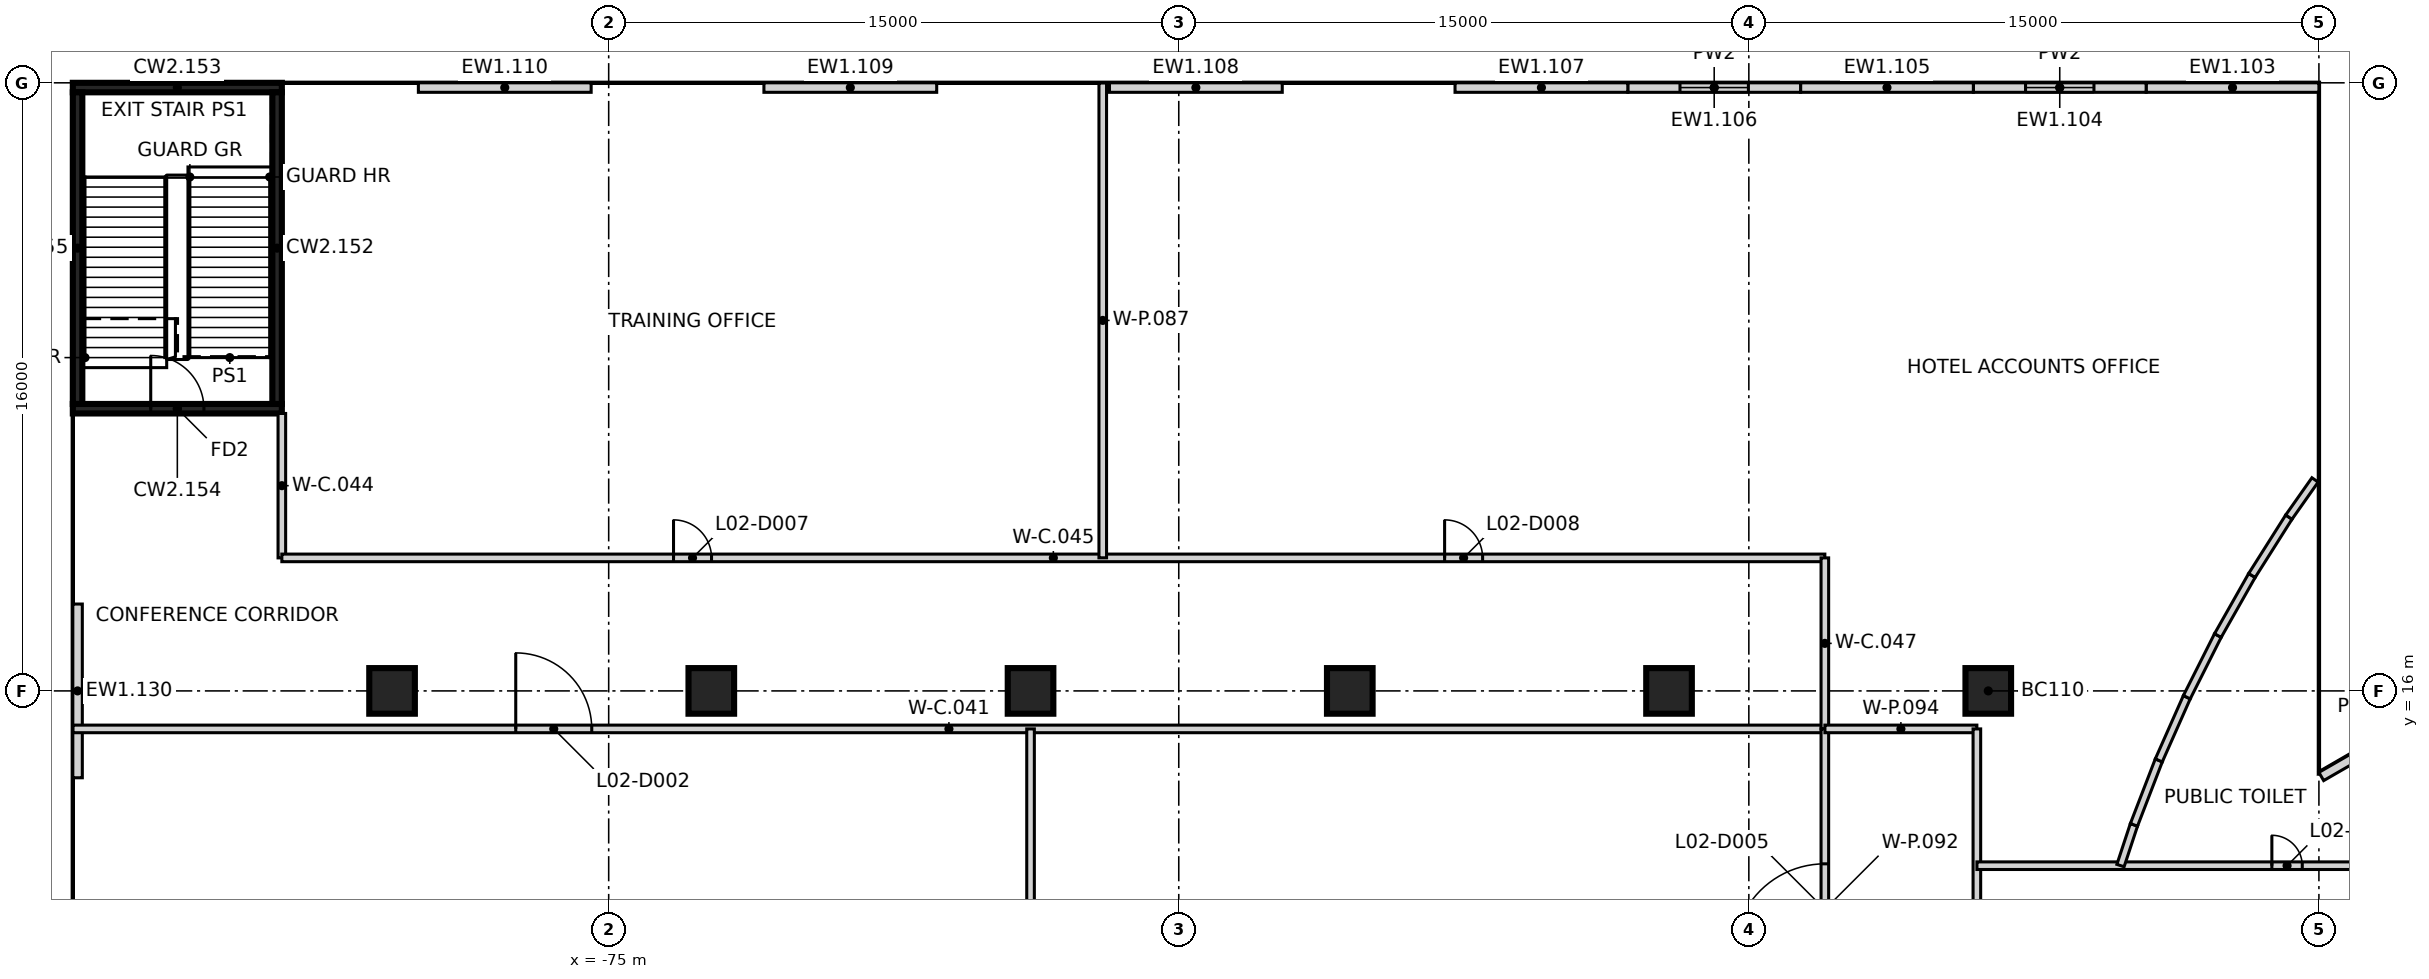
"""IFC4 building model, lengths in metres.
Left out: names, types, materials, properties, quantities, classifications, styles, units other than length and angle.
Written with IfcOpenShell. Run it as: python <this file> out.ifc"""

import sys

from ifc_helpers import new_model, si_unit, direction, frame, frame_2d, origin, origin_2d, place, context, subcontext, project, spatial, rectangle, extrude, element, fill, save


model = new_model("IFC4")
c1 = context("Model", 3, precision=1e-05, world=origin(), true_north=direction((0.0, 1.0)))
c2 = subcontext(c1, "Body", "Model", "MODEL_VIEW")
j1 = project(units=[si_unit("LENGTHUNIT", "METRE"), si_unit("PLANEANGLEUNIT", "RADIAN")], contexts=[c1])
p1 = place(None, origin())
s1 = spatial("IfcSite", under=j1, at=p1, CompositionType="ELEMENT")
p2 = place(p1, origin())
s2 = spatial("IfcBuilding", under=s1, at=p2, CompositionType="ELEMENT")
p3 = place(p2, frame((0.0, 0.0, 14.0)))
s3 = spatial("IfcBuildingStorey", under=s2, at=p3, CompositionType="ELEMENT", Elevation=14.0)
for number, where, z_axis, x_axis in (
    (1, (-80.7, 16.0, -0.35), (0.0, 0.0, 1.0), (1.0, 0.0, 0.0)),
    (2, (-72.3, 16.0, -0.35), (0.0, 0.0, 1.0), (1.0, 0.0, 0.0)),
    (3, (-63.9, 16.0, -0.35), (0.0, 0.0, 1.0), (1.0, 0.0, 0.0)),
    (4, (-55.5, 16.0, -0.35), (0.0, 0.0, 1.0), (1.0, 0.0, 0.0)),
    (5, (-47.1, 16.0, -0.35), (0.0, 0.0, 1.0), (1.0, 0.0, 0.0)),
    (6, (-38.7, 16.0, -0.35), (0.0, 0.0, 1.0), (1.0, 0.0, 0.0)),
):
    element("IfcColumn", number, at=place(p3, frame(where, z_axis=z_axis, x_axis=x_axis)), inside=s3, PredefinedType="COLUMN", context=c2, shape_type="SweptSolid", body=[
        extrude(rectangle(XDim=1.2, YDim=1.2, at=origin_2d()), origin(), (0.0, 0.0, 1.0), 5.5),
    ])
p4 = place(p3, frame((-29.938, 13.748, 0.0), z_axis=(0.0, 0.0, 1.0), x_axis=(0.866193503994, 0.4997087288, 0.0)))
e7 = element("IfcWall", 7, at=p4, inside=s3, PredefinedType="SOLIDWALL", context=c2, shape_type="SweptSolid", body=[
    extrude(rectangle(XDim=4.62, YDim=0.25, at=frame_2d((2.31, 0.0))), origin(), (0.0, 0.0, 1.0), 5.15),
])
p5 = place(p4, frame((1.41, 0.0, 1.1)))
e8 = element("IfcOpeningElement", 8, at=p5, cuts=e7, PredefinedType="OPENING", context=c2, shape_type="SweptSolid", body=[
    extrude(rectangle(XDim=1.8, YDim=1.5, at=frame_2d((0.9, 0.75))), frame((0.0, 0.135, 0.0), z_axis=(0.0, -1.0, 0.0), x_axis=(1.0, 0.0, 0.0)), (0.0, 0.0, 1.0), 0.27),
])
p6 = place(p3, frame((-34.546, 31.875, 0.0), z_axis=(0.0, 0.0, 1.0), x_axis=(1.0, 0.0, 0.0)))
e9 = element("IfcWall", 9, at=p6, inside=s3, PredefinedType="SOLIDWALL", context=c2, shape_type="SweptSolid", body=[
    extrude(rectangle(XDim=4.546, YDim=0.25, at=frame_2d((2.273, 0.0))), origin(), (0.0, 0.0, 1.0), 5.15),
])
p7 = place(p3, frame((-39.092, 31.875, 0.0), z_axis=(0.0, 0.0, 1.0), x_axis=(1.0, 0.0, 0.0)))
e10 = element("IfcWall", 10, at=p7, inside=s3, PredefinedType="SOLIDWALL", context=c2, shape_type="SweptSolid", body=[
    extrude(rectangle(XDim=4.546, YDim=0.25, at=frame_2d((2.273, 0.0))), origin(), (0.0, 0.0, 1.0), 5.15),
])
p8 = place(p7, frame((1.373, 0.0, 1.1)))
e11 = element("IfcOpeningElement", 11, at=p8, cuts=e10, PredefinedType="OPENING", context=c2, shape_type="SweptSolid", body=[
    extrude(rectangle(XDim=1.8, YDim=1.5, at=frame_2d((0.9, 0.75))), frame((0.0, 0.135, 0.0), z_axis=(0.0, -1.0, 0.0), x_axis=(1.0, 0.0, 0.0)), (0.0, 0.0, 1.0), 0.27),
])
p9 = place(p3, frame((-43.638, 31.875, 0.0), z_axis=(0.0, 0.0, 1.0), x_axis=(1.0, 0.0, 0.0)))
e12 = element("IfcWall", 12, at=p9, inside=s3, PredefinedType="SOLIDWALL", context=c2, shape_type="SweptSolid", body=[
    extrude(rectangle(XDim=4.546, YDim=0.25, at=frame_2d((2.273, 0.0))), origin(), (0.0, 0.0, 1.0), 5.15),
])
p10 = place(p3, frame((-48.185, 31.875, 0.0), z_axis=(0.0, 0.0, 1.0), x_axis=(1.0, 0.0, 0.0)))
e13 = element("IfcWall", 13, at=p10, inside=s3, PredefinedType="SOLIDWALL", context=c2, shape_type="SweptSolid", body=[
    extrude(rectangle(XDim=4.546, YDim=0.25, at=frame_2d((2.273, 0.0))), origin(), (0.0, 0.0, 1.0), 5.15),
])
p11 = place(p10, frame((1.373, 0.0, 1.1)))
e14 = element("IfcOpeningElement", 14, at=p11, cuts=e13, PredefinedType="OPENING", context=c2, shape_type="SweptSolid", body=[
    extrude(rectangle(XDim=1.8, YDim=1.5, at=frame_2d((0.9, 0.75))), frame((0.0, 0.135, 0.0), z_axis=(0.0, -1.0, 0.0), x_axis=(1.0, 0.0, 0.0)), (0.0, 0.0, 1.0), 0.27),
])
for number, where, z_axis, x_axis in (
    (15, (-52.731, 31.875, 0.0), (0.0, 0.0, 1.0), (1.0, 0.0, 0.0)),
    (16, (-61.823, 31.875, 0.0), (0.0, 0.0, 1.0), (1.0, 0.0, 0.0)),
    (17, (-70.915, 31.875, 0.0), (0.0, 0.0, 1.0), (1.0, 0.0, 0.0)),
):
    element("IfcWall", number, at=place(p3, frame(where, z_axis=z_axis, x_axis=x_axis)), inside=s3, PredefinedType="SOLIDWALL", context=c2, shape_type="SweptSolid", body=[
        extrude(rectangle(XDim=4.546, YDim=0.25, at=frame_2d((2.273, 0.0))), origin(), (0.0, 0.0, 1.0), 5.15),
    ])
p12 = place(p3, frame((-80.008, 31.875, 0.0), z_axis=(0.0, 0.0, 1.0), x_axis=(1.0, 0.0, 0.0)))
e18 = element("IfcWall", 18, at=p12, inside=s3, PredefinedType="SOLIDWALL", context=c2, shape_type="SweptSolid", body=[
    extrude(rectangle(XDim=4.546, YDim=0.25, at=frame_2d((2.273, 0.0))), origin(), (0.0, 0.0, 1.0), 5.15),
])
p13 = place(p3, frame((-88.975, 13.714, 0.0), z_axis=(0.0, 0.0, 1.0), x_axis=(0.0, 1.0, 0.0)))
e19 = element("IfcWall", 19, at=p13, inside=s3, PredefinedType="SOLIDWALL", context=c2, shape_type="SweptSolid", body=[
    extrude(rectangle(XDim=4.571, YDim=0.25, at=frame_2d((2.286, 0.0))), origin(), (0.0, 0.0, 1.0), 5.15),
])
p14 = place(p3, frame((-89.1, 23.425, 0.0), z_axis=(0.0, 0.0, 1.0), x_axis=(1.0, 0.0, 0.0)))
e20 = element("IfcWall", 20, at=p14, inside=s3, PredefinedType="SHEAR", context=c2, shape_type="SweptSolid", body=[
    extrude(rectangle(XDim=5.5, YDim=0.25, at=frame_2d((2.75, 0.0))), origin(), (0.0, 0.0, 1.0), 5.15),
])
p15 = place(p14, frame((2.05, 0.0, 0.0)))
e21 = element("IfcOpeningElement", 21, at=p15, cuts=e20, PredefinedType="OPENING", context=c2, shape_type="SweptSolid", body=[
    extrude(rectangle(XDim=1.4, YDim=2.1, at=frame_2d((0.7, 1.05))), frame((0.0, 0.135, 0.0), z_axis=(0.0, -1.0, 0.0), x_axis=(1.0, 0.0, 0.0)), (0.0, 0.0, 1.0), 0.27),
])
p16 = place(p3, frame((-89.1, 31.875, 0.0), z_axis=(0.0, 0.0, 1.0), x_axis=(1.0, 0.0, 0.0)))
e22 = element("IfcWall", 22, at=p16, inside=s3, PredefinedType="SHEAR", context=c2, shape_type="SweptSolid", body=[
    extrude(rectangle(XDim=5.5, YDim=0.25, at=frame_2d((2.75, 0.0))), origin(), (0.0, 0.0, 1.0), 5.15),
])
for number, where, z_axis, x_axis in (
    (23, (-88.975, 23.55, 0.0), (0.0, 0.0, 1.0), (0.0, 1.0, 0.0)),
    (24, (-83.725, 23.55, 0.0), (0.0, 0.0, 1.0), (0.0, 1.0, 0.0)),
):
    element("IfcWall", number, at=place(p3, frame(where, z_axis=z_axis, x_axis=x_axis)), inside=s3, PredefinedType="SHEAR", context=c2, shape_type="SweptSolid", body=[
        extrude(rectangle(XDim=8.2, YDim=0.25, at=frame_2d((4.1, 0.0))), origin(), (0.0, 0.0, 1.0), 5.15),
    ])
p17 = place(p3, frame((-89.095, 15.0, 0.0), z_axis=(0.0, 0.0, 1.0), x_axis=(1.0, 0.0, 0.0)))
e25 = element("IfcWall", 25, at=p17, inside=s3, PredefinedType="PARTITIONING", context=c2, shape_type="SweptSolid", body=[
    extrude(rectangle(XDim=46.095, YDim=0.2, at=frame_2d((23.047, 0.0))), origin(), (0.0, 0.0, 1.0), 5.15),
])
p18 = place(p17, frame((11.649, 0.0, 0.0)))
e26 = element("IfcOpeningElement", 26, at=p18, cuts=e25, PredefinedType="OPENING", context=c2, shape_type="SweptSolid", body=[
    extrude(rectangle(XDim=2.0, YDim=2.1, at=frame_2d((1.0, 1.05))), frame((0.0, 0.11, 0.0), z_axis=(0.0, -1.0, 0.0), x_axis=(1.0, 0.0, 0.0)), (0.0, 0.0, 1.0), 0.22),
])
p19 = place(p3, frame((-83.6, 19.5, 0.0), z_axis=(0.0, 0.0, 1.0), x_axis=(0.0, 1.0, 0.0)))
e27 = element("IfcWall", 27, at=p19, inside=s3, PredefinedType="PARTITIONING", context=c2, shape_type="SweptSolid", body=[
    extrude(rectangle(XDim=3.8, YDim=0.2, at=frame_2d((1.9, 0.0))), origin(), (0.0, 0.0, 1.0), 5.15),
])
p20 = place(p3, frame((-83.6, 19.5, 0.0), z_axis=(0.0, 0.0, 1.0), x_axis=(1.0, 0.0, 0.0)))
e28 = element("IfcWall", 28, at=p20, inside=s3, PredefinedType="PARTITIONING", context=c2, shape_type="SweptSolid", body=[
    extrude(rectangle(XDim=40.6, YDim=0.2, at=frame_2d((20.3, 0.0))), origin(), (0.0, 0.0, 1.0), 5.15),
])
p21 = place(p20, frame((10.306, 0.0, 0.0)))
e29 = element("IfcOpeningElement", 29, at=p21, cuts=e28, PredefinedType="OPENING", context=c2, shape_type="SweptSolid", body=[
    extrude(rectangle(XDim=1.0, YDim=2.1, at=frame_2d((0.5, 1.05))), frame((0.0, 0.11, 0.0), z_axis=(0.0, -1.0, 0.0), x_axis=(1.0, 0.0, 0.0)), (0.0, 0.0, 1.0), 0.22),
])
p22 = place(p20, frame((30.595, 0.0, 0.0)))
e30 = element("IfcOpeningElement", 30, at=p22, cuts=e28, PredefinedType="OPENING", context=c2, shape_type="SweptSolid", body=[
    extrude(rectangle(XDim=1.0, YDim=2.1, at=frame_2d((0.5, 1.05))), frame((0.0, 0.11, 0.0), z_axis=(0.0, -1.0, 0.0), x_axis=(1.0, 0.0, 0.0)), (0.0, 0.0, 1.0), 0.22),
])
p23 = place(p3, frame((-43.0, 15.002, 0.0), z_axis=(0.0, 0.0, 1.0), x_axis=(0.0, 1.0, 0.0)))
e31 = element("IfcWall", 31, at=p23, inside=s3, PredefinedType="PARTITIONING", context=c2, shape_type="SweptSolid", body=[
    extrude(rectangle(XDim=4.498, YDim=0.2, at=frame_2d((2.249, 0.0))), origin(), (0.0, 0.0, 1.0), 5.15),
])
p24 = place(p3, frame((-63.9, -15.0, 0.0), z_axis=(0.0, 0.0, 1.0), x_axis=(0.0, 1.0, 0.0)))
e32 = element("IfcWall", 32, at=p24, inside=s3, PredefinedType="PARTITIONING", context=c2, shape_type="SweptSolid", body=[
    extrude(rectangle(XDim=30.0, YDim=0.2, at=frame_2d((15.0, 0.0))), origin(), (0.0, 0.0, 1.0), 5.15),
])
p25 = place(p24, frame((11.25, 0.0, 0.0)))
e33 = element("IfcOpeningElement", 33, at=p25, cuts=e32, PredefinedType="OPENING", context=c2, shape_type="SweptSolid", body=[
    extrude(rectangle(XDim=2.0, YDim=2.1, at=frame_2d((1.0, 1.05))), frame((0.0, 0.11, 0.0), z_axis=(0.0, -1.0, 0.0), x_axis=(1.0, 0.0, 0.0)), (0.0, 0.0, 1.0), 0.22),
])
p26 = place(p3, frame((-62.0, 19.502, 0.0), z_axis=(0.0, 0.0, 1.0), x_axis=(0.0, 1.0, 0.0)))
e34 = element("IfcWall", 34, at=p26, inside=s3, PredefinedType="PARTITIONING", context=c2, shape_type="SweptSolid", body=[
    extrude(rectangle(XDim=12.493, YDim=0.2, at=frame_2d((6.247, 0.0))), origin(), (0.0, 0.0, 1.0), 5.15),
])
p27 = place(p3, frame((-43.0, 5.5, 0.0), z_axis=(0.0, 0.0, 1.0), x_axis=(0.0, 1.0, 0.0)))
e35 = element("IfcWall", 35, at=p27, inside=s3, PredefinedType="PARTITIONING", context=c2, shape_type="SweptSolid", body=[
    extrude(rectangle(XDim=9.5, YDim=0.2, at=frame_2d((4.75, 0.0))), origin(), (0.0, 0.0, 1.0), 5.15),
])
p28 = place(p27, frame((3.55, 0.0, 0.0)))
e36 = element("IfcOpeningElement", 36, at=p28, cuts=e35, PredefinedType="OPENING", context=c2, shape_type="SweptSolid", body=[
    extrude(rectangle(XDim=2.4, YDim=2.1, at=frame_2d((1.2, 1.05))), frame((0.0, 0.11, 0.0), z_axis=(0.0, -1.0, 0.0), x_axis=(1.0, 0.0, 0.0)), (0.0, 0.0, 1.0), 0.22),
])
p29 = place(p3, frame((-42.998, 15.0, 0.0), z_axis=(0.0, 0.0, 1.0), x_axis=(1.0, 0.0, 0.0)))
e37 = element("IfcWall", 37, at=p29, inside=s3, PredefinedType="PARTITIONING", context=c2, shape_type="SweptSolid", body=[
    extrude(rectangle(XDim=3.998, YDim=0.2, at=frame_2d((1.999, 0.0))), origin(), (0.0, 0.0, 1.0), 5.15),
])
p30 = place(p3, frame((-39.0, -15.0, 0.0), z_axis=(0.0, 0.0, 1.0), x_axis=(0.0, 1.0, 0.0)))
e38 = element("IfcWall", 38, at=p30, inside=s3, PredefinedType="PARTITIONING", context=c2, shape_type="SweptSolid", body=[
    extrude(rectangle(XDim=30.0, YDim=0.2, at=frame_2d((15.0, 0.0))), origin(), (0.0, 0.0, 1.0), 5.15),
])
p31 = place(p30, frame((20.75, 0.0, 0.0)))
e39 = element("IfcOpeningElement", 39, at=p31, cuts=e38, PredefinedType="OPENING", context=c2, shape_type="SweptSolid", body=[
    extrude(rectangle(XDim=2.4, YDim=2.1, at=frame_2d((1.2, 1.05))), frame((0.0, 0.11, 0.0), z_axis=(0.0, -1.0, 0.0), x_axis=(1.0, 0.0, 0.0)), (0.0, 0.0, 1.0), 0.22),
])
p32 = place(p3, frame((-38.998, 11.401, 0.0), z_axis=(0.0, 0.0, 1.0), x_axis=(1.0, 0.0, 0.0)))
e40 = element("IfcWall", 40, at=p32, inside=s3, PredefinedType="PARTITIONING", context=c2, shape_type="SweptSolid", body=[
    extrude(rectangle(XDim=29.995, YDim=0.2, at=frame_2d((14.998, 0.0))), origin(), (0.0, 0.0, 1.0), 2.75),
])
p33 = place(p32, frame((25.143, 0.0, 0.0)))
e41 = element("IfcOpeningElement", 41, at=p33, cuts=e40, PredefinedType="OPENING", context=c2, shape_type="SweptSolid", body=[
    extrude(rectangle(XDim=1.0, YDim=2.1, at=frame_2d((0.5, 1.05))), frame((0.0, 0.11, 0.0), z_axis=(0.0, -1.0, 0.0), x_axis=(1.0, 0.0, 0.0)), (0.0, 0.0, 1.0), 0.22),
])
p34 = place(p32, frame((7.76, 0.0, 0.0)))
e42 = element("IfcOpeningElement", 42, at=p34, cuts=e40, PredefinedType="OPENING", context=c2, shape_type="SweptSolid", body=[
    extrude(rectangle(XDim=0.8, YDim=2.1, at=frame_2d((0.4, 1.05))), frame((0.0, 0.11, 0.0), z_axis=(0.0, -1.0, 0.0), x_axis=(1.0, 0.0, 0.0)), (0.0, 0.0, 1.0), 0.22),
])
p35 = place(p32, frame((16.034, 0.0, 0.0)))
e43 = element("IfcOpeningElement", 43, at=p35, cuts=e40, PredefinedType="OPENING", context=c2, shape_type="SweptSolid", body=[
    extrude(rectangle(XDim=0.9, YDim=2.1, at=frame_2d((0.45, 1.05))), frame((0.0, 0.11, 0.0), z_axis=(0.0, -1.0, 0.0), x_axis=(1.0, 0.0, 0.0)), (0.0, 0.0, 1.0), 0.22),
])
p36 = place(p3, frame((-35.221, 11.404, 0.0), z_axis=(0.0, 0.0, 1.0), x_axis=(0.313566613152, 0.949566205757, 0.0)))
e44 = element("IfcWall", 44, at=p36, inside=s3, PredefinedType="PARTITIONING", context=c2, shape_type="SweptSolid", body=[
    extrude(rectangle(XDim=1.129, YDim=0.2, at=frame_2d((0.564, 0.0))), origin(), (0.0, 0.0, 1.0), 5.15),
])
for number, where, z_axis, x_axis in (
    (45, (-34.867, 12.476, 0.0), (0.0, 0.0, 1.0), (0.36, 0.933, 0.0)),
    (46, (-34.213, 14.172, 0.0), (0.0, 0.0, 1.0), (0.405, 0.914, 0.0)),
):
    element("IfcWall", number, at=place(p3, frame(where, z_axis=z_axis, x_axis=x_axis)), inside=s3, PredefinedType="PARTITIONING", context=c2, shape_type="SweptSolid", body=[
        extrude(rectangle(XDim=1.818, YDim=0.2, at=frame_2d((0.909, 0.0))), origin(), (0.0, 0.0, 1.0), 5.15),
    ])
p37 = place(p3, frame((-33.476, 15.834, 0.0), z_axis=(0.0, 0.0, 1.0), x_axis=(0.449684007343, 0.893187714615, 0.0)))
e47 = element("IfcWall", 47, at=p37, inside=s3, PredefinedType="PARTITIONING", context=c2, shape_type="SweptSolid", body=[
    extrude(rectangle(XDim=1.817, YDim=0.2, at=frame_2d((0.909, 0.0))), origin(), (0.0, 0.0, 1.0), 5.15),
])
p38 = place(p3, frame((-32.659, 17.457, 0.0), z_axis=(0.0, 0.0, 1.0), x_axis=(0.493270284448, 0.86987609835, 0.0)))
e48 = element("IfcWall", 48, at=p38, inside=s3, PredefinedType="PARTITIONING", context=c2, shape_type="SweptSolid", body=[
    extrude(rectangle(XDim=1.816, YDim=0.2, at=frame_2d((0.908, 0.0))), origin(), (0.0, 0.0, 1.0), 5.15),
])
p39 = place(p3, frame((-31.763, 19.037, 0.0), z_axis=(0.0, 0.0, 1.0), x_axis=(0.534735678729, 0.84501938078, 0.0)))
e49 = element("IfcWall", 49, at=p39, inside=s3, PredefinedType="PARTITIONING", context=c2, shape_type="SweptSolid", body=[
    extrude(rectangle(XDim=1.818, YDim=0.2, at=frame_2d((0.909, 0.0))), origin(), (0.0, 0.0, 1.0), 5.15),
])
p40 = place(p3, frame((-30.791, 20.573, 0.0), z_axis=(0.0, 0.0, 1.0), x_axis=(0.575897739976, 0.817521738605, 0.0)))
e50 = element("IfcWall", 50, at=p40, inside=s3, PredefinedType="PARTITIONING", context=c2, shape_type="SweptSolid", body=[
    extrude(rectangle(XDim=1.196, YDim=0.2, at=frame_2d((0.598, 0.0))), origin(), (0.0, 0.0, 1.0), 5.15),
])
p41 = place(p8, origin())
e51 = element("IfcWindow", 51, at=p41, inside=s3, PartitioningType="SINGLE_PANEL", PredefinedType="WINDOW", context=c2, shape_type="SweptSolid", body=[
    extrude(rectangle(XDim=1.8, YDim=1.5, at=frame_2d((0.9, 0.75))), frame((0.0, 0.03, 0.0), z_axis=(0.0, -1.0, 0.0), x_axis=(1.0, 0.0, 0.0)), (0.0, 0.0, 1.0), 0.06),
])
fill(e11, e51)
p42 = place(p11, origin())
e52 = element("IfcWindow", 52, at=p42, inside=s3, PartitioningType="SINGLE_PANEL", PredefinedType="WINDOW", context=c2, shape_type="SweptSolid", body=[
    extrude(rectangle(XDim=1.8, YDim=1.5, at=frame_2d((0.9, 0.75))), frame((0.0, 0.03, 0.0), z_axis=(0.0, -1.0, 0.0), x_axis=(1.0, 0.0, 0.0)), (0.0, 0.0, 1.0), 0.06),
])
fill(e14, e52)
p43 = place(p15, origin())
e53 = element("IfcDoor", 53, at=p43, inside=s3, OperationType="SINGLE_SWING_LEFT", PredefinedType="DOOR", context=c2, shape_type="SweptSolid", body=[
    extrude(rectangle(XDim=1.4, YDim=2.1, at=frame_2d((0.7, 1.05))), frame((0.0, 0.025, 0.0), z_axis=(0.0, -1.0, 0.0), x_axis=(1.0, 0.0, 0.0)), (0.0, 0.0, 1.0), 0.05),
])
fill(e21, e53)
p44 = place(p18, frame((2.0, 0.0, 0.0), z_axis=(0.0, 0.0, 1.0), x_axis=(-1.0, 0.0, 0.0)))
e54 = element("IfcDoor", 54, at=p44, inside=s3, OperationType="DOUBLE_DOOR_SINGLE_SWING", PredefinedType="DOOR", context=c2, shape_type="SweptSolid", body=[
    extrude(rectangle(XDim=2.0, YDim=2.1, at=frame_2d((1.0, 1.05))), frame((0.0, 0.025, 0.0), z_axis=(0.0, -1.0, 0.0), x_axis=(1.0, 0.0, 0.0)), (0.0, 0.0, 1.0), 0.05),
])
fill(e26, e54)
p45 = place(p28, origin())
e55 = element("IfcDoor", 55, at=p45, inside=s3, OperationType="DOUBLE_DOOR_SINGLE_SWING", PredefinedType="DOOR", context=c2, shape_type="SweptSolid", body=[
    extrude(rectangle(XDim=2.4, YDim=2.1, at=frame_2d((1.2, 1.05))), frame((0.0, 0.025, 0.0), z_axis=(0.0, -1.0, 0.0), x_axis=(1.0, 0.0, 0.0)), (0.0, 0.0, 1.0), 0.05),
])
fill(e36, e55)
p46 = place(p21, origin())
e56 = element("IfcDoor", 56, at=p46, inside=s3, OperationType="SINGLE_SWING_LEFT", PredefinedType="DOOR", context=c2, shape_type="SweptSolid", body=[
    extrude(rectangle(XDim=1.0, YDim=2.1, at=frame_2d((0.5, 1.05))), frame((0.0, 0.025, 0.0), z_axis=(0.0, -1.0, 0.0), x_axis=(1.0, 0.0, 0.0)), (0.0, 0.0, 1.0), 0.05),
])
fill(e29, e56)
p47 = place(p22, origin())
e57 = element("IfcDoor", 57, at=p47, inside=s3, OperationType="SINGLE_SWING_LEFT", PredefinedType="DOOR", context=c2, shape_type="SweptSolid", body=[
    extrude(rectangle(XDim=1.0, YDim=2.1, at=frame_2d((0.5, 1.05))), frame((0.0, 0.025, 0.0), z_axis=(0.0, -1.0, 0.0), x_axis=(1.0, 0.0, 0.0)), (0.0, 0.0, 1.0), 0.05),
])
fill(e30, e57)
p48 = place(p34, origin())
e58 = element("IfcDoor", 58, at=p48, inside=s3, OperationType="SINGLE_SWING_LEFT", PredefinedType="DOOR", context=c2, shape_type="SweptSolid", body=[
    extrude(rectangle(XDim=0.8, YDim=2.1, at=frame_2d((0.4, 1.05))), frame((0.0, 0.025, 0.0), z_axis=(0.0, -1.0, 0.0), x_axis=(1.0, 0.0, 0.0)), (0.0, 0.0, 1.0), 0.05),
])
fill(e42, e58)
save(model, sys.argv[1])
